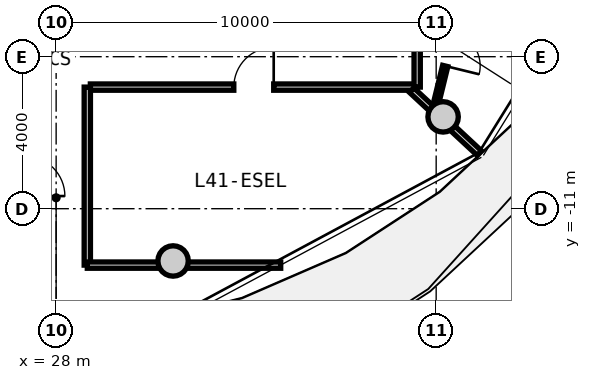
"""IFC4 building model, lengths in metres.
Left out: names, types, materials, properties, quantities, classifications, styles, units other than length and angle.
Written with IfcOpenShell. Run it as: python <this file> out.ifc"""

import sys

from ifc_helpers import new_model, si_unit, direction, frame, frame_2d, origin, origin_2d, place, context, subcontext, project, spatial, rectangle, circle, extrude, source, transform, mapped, element, fill, save


model = new_model("IFC4")
c1 = context("Model", 3, precision=1e-05, world=origin(), true_north=direction((0.0, 1.0)))
c2 = subcontext(c1, "Body", "Model", "MODEL_VIEW")
j1 = project(units=[si_unit("LENGTHUNIT", "METRE"), si_unit("PLANEANGLEUNIT", "RADIAN")], contexts=[c1])
p1 = place(None, origin())
s1 = spatial("IfcSite", under=j1, at=p1, CompositionType="ELEMENT")
p2 = place(p1, origin())
s2 = spatial("IfcBuilding", under=s1, at=p2, CompositionType="ELEMENT")
p3 = place(p2, frame((0.0, 0.0, 134.3)))
s3 = spatial("IfcBuildingStorey", under=s2, at=p3, CompositionType="ELEMENT", Elevation=134.3)
m1 = source(origin(), c2, "Body", "SweptSolid", [
    extrude(circle(Radius=0.4, at=origin_2d()), origin(), (0.0, 0.0, 1.0), 3.47),
])
for number, where, z_axis, x_axis in (
    (1, (31.077, -12.375, -0.42), (0.0, 0.0, 1.0), (1.0, 0.0, 0.0)),
    (2, (38.183, -8.584, -0.42), (0.0, 0.0, 1.0), (1.0, 0.0, 0.0)),
):
    element("IfcColumn", number, at=place(p3, frame(where, z_axis=z_axis, x_axis=x_axis)), inside=s3, PredefinedType="COLUMN", context=c2, shape_type="MappedRepresentation", body=[
        mapped(m1, transform((0.0, 0.0, 0.0), x_axis=(1.0, 0.0, 0.0), y_axis=(0.0, 1.0, 0.0), z_axis=(0.0, 0.0, 1.0), scale=1.0)),
    ])
m2 = source(origin(), c2, "Body", "SweptSolid", [
    extrude(rectangle(XDim=8.6, YDim=0.165, at=frame_2d((4.3, 0.0))), origin(), (0.0, 0.0, 1.0), 2.795),
])
p4 = place(p3, frame((37.5, -7.8, 0.0), z_axis=(0.0, 0.0, 1.0), x_axis=(-1.0, 0.0, 0.0)))
e3 = element("IfcWall", 3, at=p4, inside=s3, PredefinedType="PARTITIONING", context=c2, shape_type="MappedRepresentation", body=[
    mapped(m2, transform((0.0, 0.0, 0.0), x_axis=(1.0, 0.0, 0.0), y_axis=(0.0, 1.0, 0.0), z_axis=(0.0, 0.0, 1.0), scale=1.0)),
])
p5 = place(p4, frame((3.775, 0.0, 0.0)))
e4 = element("IfcOpeningElement", 4, at=p5, cuts=e3, PredefinedType="OPENING", context=c2, shape_type="SweptSolid", body=[
    extrude(rectangle(XDim=1.05, YDim=2.15, at=frame_2d((0.525, 1.075))), frame((0.0, 0.093, 0.0), z_axis=(0.0, -1.0, 0.0), x_axis=(1.0, 0.0, 0.0)), (0.0, 0.0, 1.0), 0.185),
])
m3 = source(origin(), c2, "Body", "SweptSolid", [
    extrude(rectangle(XDim=15.6, YDim=0.165, at=frame_2d((7.8, 0.0))), origin(), (0.0, 0.0, 1.0), 2.795),
])
p6 = place(p3, frame((37.5, 7.8, 0.0), z_axis=(0.0, 0.0, 1.0), x_axis=(0.0, -1.0, 0.0)))
e5 = element("IfcWall", 5, at=p6, inside=s3, PredefinedType="PARTITIONING", context=c2, shape_type="MappedRepresentation", body=[
    mapped(m3, transform((0.0, 0.0, 0.0), x_axis=(1.0, 0.0, 0.0), y_axis=(0.0, 1.0, 0.0), z_axis=(0.0, 0.0, 1.0), scale=1.0)),
])
p7 = place(p6, frame((5.687, 0.0, 0.0)))
e6 = element("IfcOpeningElement", 6, at=p7, cuts=e5, PredefinedType="OPENING", context=c2, shape_type="SweptSolid", body=[
    extrude(rectangle(XDim=1.05, YDim=2.15, at=frame_2d((0.525, 1.075))), frame((0.0, 0.093, 0.0), z_axis=(0.0, -1.0, 0.0), x_axis=(1.0, 0.0, 0.0)), (0.0, 0.0, 1.0), 0.185),
])
m4 = source(origin(), c2, "Body", "SweptSolid", [
    extrude(rectangle(XDim=2.435, YDim=0.165, at=frame_2d((1.217, 0.0))), origin(), (0.0, 0.0, 1.0), 2.345),
])
p8 = place(p3, frame((37.354, -7.88, 0.0), z_axis=(0.0, 0.0, 1.0), x_axis=(0.732164643118, -0.681127693878, 0.0)))
e7 = element("IfcWall", 7, at=p8, inside=s3, PredefinedType="PARTITIONING", context=c2, shape_type="MappedRepresentation", body=[
    mapped(m4, transform((0.0, 0.0, 0.0), x_axis=(1.0, 0.0, 0.0), y_axis=(0.0, 1.0, 0.0), z_axis=(0.0, 0.0, 1.0), scale=1.0)),
])
m5 = source(origin(), c2, "Body", "SweptSolid", [
    extrude(rectangle(XDim=4.685, YDim=0.165, at=frame_2d((2.342, 0.0))), origin(), (0.0, 0.0, 1.0), 2.795),
])
p9 = place(p3, frame((28.82, -12.485, 0.0), z_axis=(0.0, 0.0, 1.0), x_axis=(0.0, 1.0, 0.0)))
e8 = element("IfcWall", 8, at=p9, inside=s3, PredefinedType="PARTITIONING", context=c2, shape_type="MappedRepresentation", body=[
    mapped(m5, transform((0.0, 0.0, 0.0), x_axis=(1.0, 0.0, 0.0), y_axis=(0.0, 1.0, 0.0), z_axis=(0.0, 0.0, 1.0), scale=1.0)),
])
m6 = source(origin(), c2, "Body", "SweptSolid", [
    extrude(rectangle(XDim=5.089, YDim=0.165, at=frame_2d((2.544, 0.0))), origin(), (0.0, 0.0, 1.0), 2.345),
])
p10 = place(p3, frame((28.82, -12.485, 0.0), z_axis=(0.0, 0.0, 1.0), x_axis=(1.0, 0.0, 0.0)))
e9 = element("IfcWall", 9, at=p10, inside=s3, PredefinedType="PARTITIONING", context=c2, shape_type="MappedRepresentation", body=[
    mapped(m6, transform((0.0, 0.0, 0.0), x_axis=(1.0, 0.0, 0.0), y_axis=(0.0, 1.0, 0.0), z_axis=(0.0, 0.0, 1.0), scale=1.0)),
])
m7 = source(origin(), c2, "Body", "SweptSolid", [
    extrude(rectangle(XDim=3.464, YDim=0.14, at=frame_2d((1.732, 0.0))), origin(), (0.0, 0.0, 1.0), 2.795),
])
p11 = place(p3, frame((38.76, -5.115, 0.0), z_axis=(0.0, 0.0, 1.0), x_axis=(-0.238055968485, -0.971251438027, 0.0)))
e10 = element("IfcWall", 10, at=p11, inside=s3, PredefinedType="PARTITIONING", context=c2, shape_type="MappedRepresentation", body=[
    mapped(m7, transform((0.0, 0.0, 0.0), x_axis=(1.0, 0.0, 0.0), y_axis=(0.0, 1.0, 0.0), z_axis=(0.0, 0.0, 1.0), scale=1.0)),
])
p12 = place(p11, frame((1.272, 0.0, 0.0)))
e11 = element("IfcOpeningElement", 11, at=p12, cuts=e10, PredefinedType="OPENING", context=c2, shape_type="SweptSolid", body=[
    extrude(rectangle(XDim=0.92, YDim=2.1, at=frame_2d((0.46, 1.05))), frame((0.0, 0.08, 0.0), z_axis=(0.0, -1.0, 0.0), x_axis=(1.0, 0.0, 0.0)), (0.0, 0.0, 1.0), 0.16),
])
m8 = source(origin(), c2, "Body", "SweptSolid", [
    extrude(rectangle(XDim=1.05, YDim=2.15, at=frame_2d((0.525, 1.075))), frame((0.0, 0.025, 0.0), z_axis=(0.0, -1.0, 0.0), x_axis=(1.0, 0.0, 0.0)), (0.0, 0.0, 1.0), 0.05),
])
p13 = place(p5, frame((1.05, 0.0, 0.0), z_axis=(0.0, 0.0, 1.0), x_axis=(-1.0, 0.0, 0.0)))
e12 = element("IfcDoor", 12, at=p13, inside=s3, OperationType="SINGLE_SWING_RIGHT", PredefinedType="DOOR", context=c2, shape_type="MappedRepresentation", body=[
    mapped(m8, transform((0.0, 0.0, 0.0), x_axis=(1.0, 0.0, 0.0), y_axis=(0.0, 1.0, 0.0), z_axis=(0.0, 0.0, 1.0), scale=1.0)),
])
fill(e4, e12)
m9 = source(origin(), c2, "Body", "SweptSolid", [
    extrude(rectangle(XDim=0.92, YDim=2.1, at=frame_2d((0.46, 1.05))), frame((0.0, 0.025, 0.0), z_axis=(0.0, -1.0, 0.0), x_axis=(1.0, 0.0, 0.0)), (0.0, 0.0, 1.0), 0.05),
])
p14 = place(p12, origin())
e13 = element("IfcDoor", 13, at=p14, inside=s3, OperationType="SINGLE_SWING_RIGHT", PredefinedType="DOOR", context=c2, shape_type="MappedRepresentation", body=[
    mapped(m9, transform((0.0, 0.0, 0.0), x_axis=(1.0, 0.0, 0.0), y_axis=(0.0, 1.0, 0.0), z_axis=(0.0, 0.0, 1.0), scale=1.0)),
])
fill(e11, e13)
save(model, sys.argv[1])
